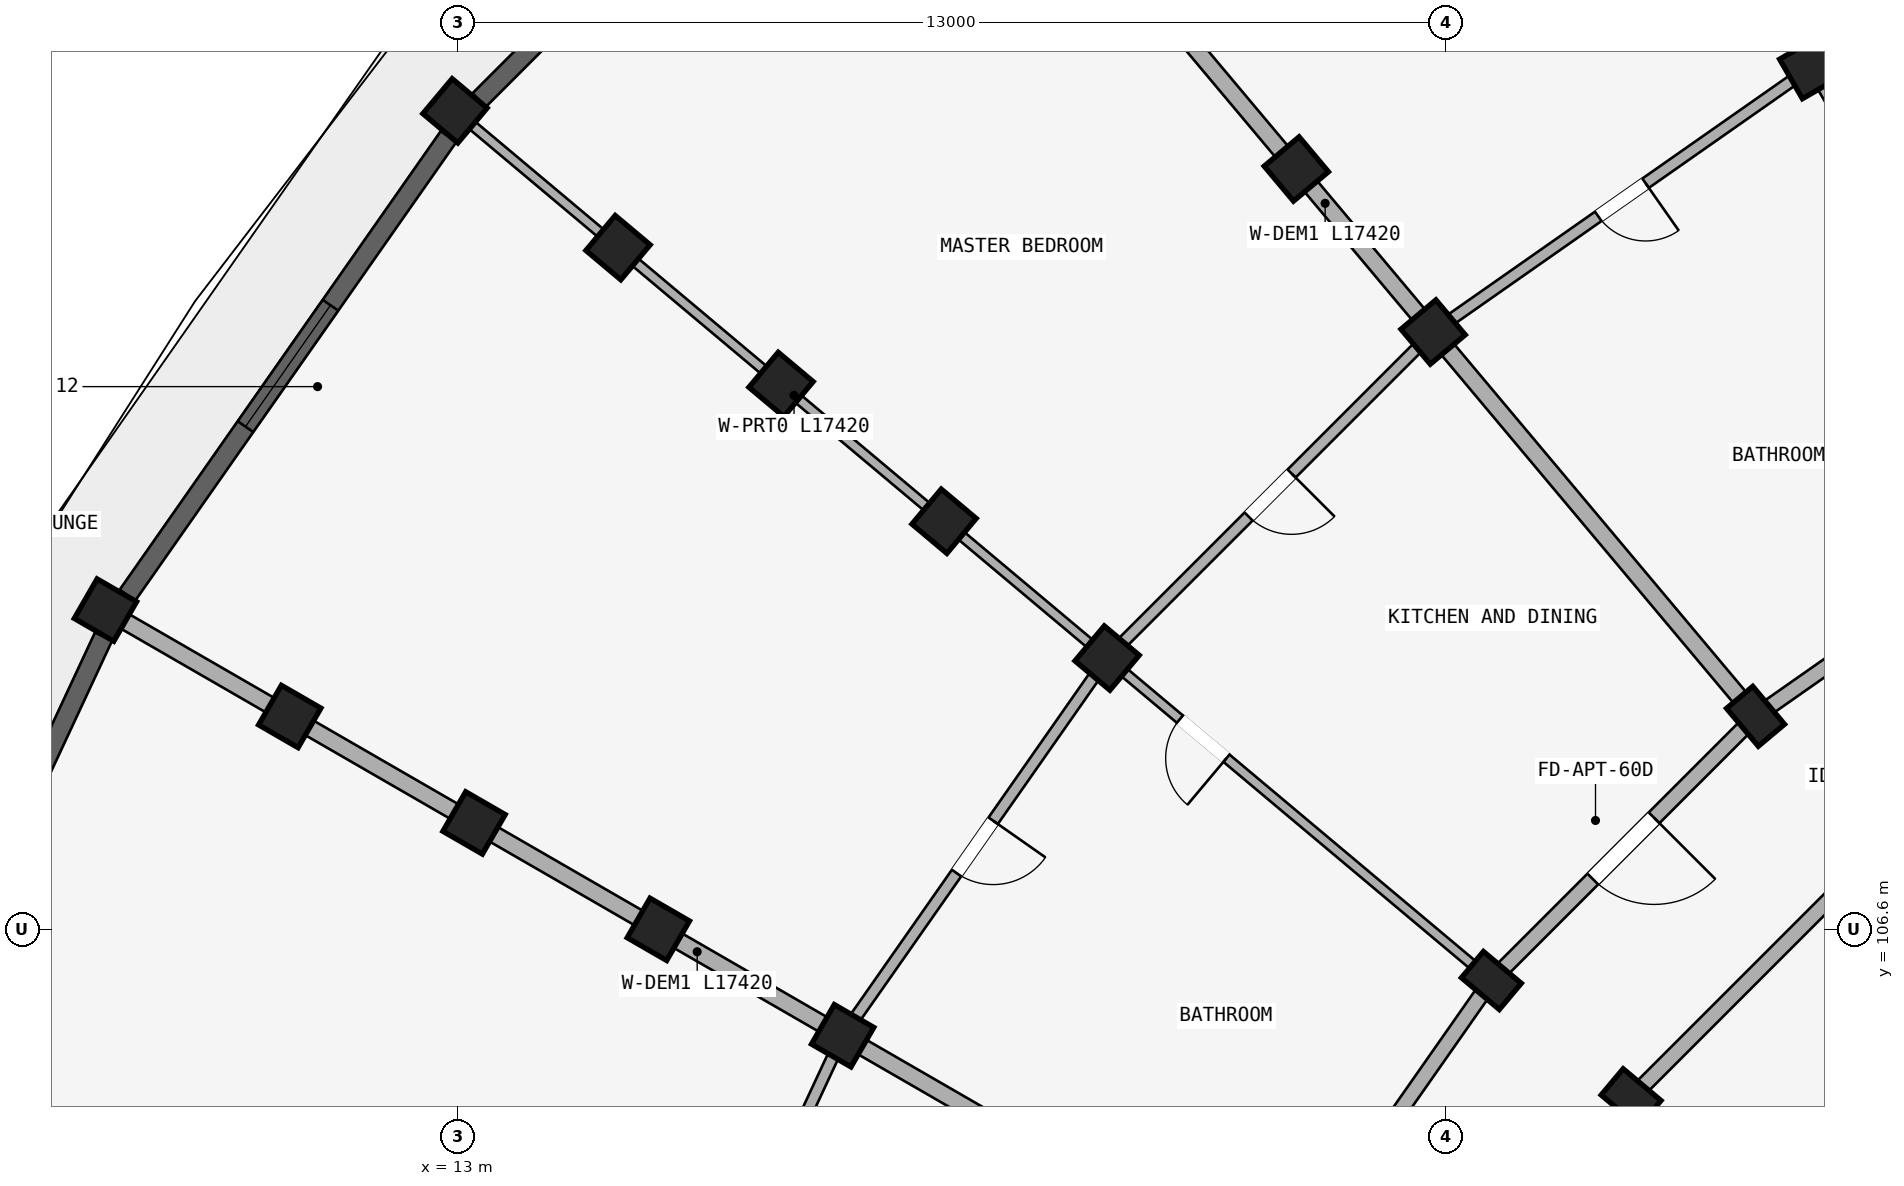
"""IFC4 building model, lengths in metres.
Left out: names, types, materials, properties, quantities, classifications, styles, units other than length and angle.
Written with IfcOpenShell. Run it as: python <this file> out.ifc"""

import sys

from ifc_helpers import new_model, si_unit, direction, frame, frame_2d, origin, origin_2d, place, context, subcontext, project, spatial, rectangle, extrude, element, fill, save


model = new_model("IFC4")
c1 = context("Model", 3, precision=1e-05, world=origin(), true_north=direction((0.0, 1.0)))
c2 = subcontext(c1, "Body", "Model", "MODEL_VIEW")
j1 = project(units=[si_unit("LENGTHUNIT", "METRE"), si_unit("PLANEANGLEUNIT", "RADIAN")], contexts=[c1])
p1 = place(None, origin())
s1 = spatial("IfcSite", under=j1, at=p1, CompositionType="ELEMENT")
p2 = place(p1, origin())
s2 = spatial("IfcBuilding", under=s1, at=p2, CompositionType="ELEMENT")
p3 = place(p2, frame((0.0, 0.0, 37.05)))
s3 = spatial("IfcBuildingStorey", under=s2, at=p3, CompositionType="ELEMENT", Elevation=37.05)
p4 = place(p3, frame((30.8, 117.938, 0.0), z_axis=(0.0, 0.0, 1.0), x_axis=(0.866025403784, 0.5, 0.0)))
e1 = element("IfcColumn", 1, at=p4, inside=s3, PredefinedType="COLUMN", context=c2, shape_type="SweptSolid", body=[
    extrude(rectangle(XDim=0.6, YDim=0.6, at=origin_2d()), origin(), (0.0, 0.0, 1.0), 2.93),
])
p5 = place(p3, frame((30.073, 109.402, 0.0), z_axis=(0.0, 0.0, 1.0), x_axis=(0.766044443119, 0.642787609687, 0.0)))
e2 = element("IfcColumn", 2, at=p5, inside=s3, PredefinedType="COLUMN", context=c2, shape_type="SweptSolid", body=[
    extrude(rectangle(XDim=0.45, YDim=0.65, at=origin_2d()), origin(), (0.0, 0.0, 1.0), 2.93),
])
for number, where, z_axis, x_axis in (
    (3, (25.831, 114.458, 0.0), (0.0, 0.0, 1.0), (0.766, 0.643, 0.0)),
    (4, (24.031, 116.603, 0.0), (0.0, 0.0, 1.0), (0.766, 0.643, 0.0)),
):
    element("IfcColumn", number, at=place(p3, frame(where, z_axis=z_axis, x_axis=x_axis)), inside=s3, PredefinedType="COLUMN", context=c2, shape_type="SweptSolid", body=[
        extrude(rectangle(XDim=0.6, YDim=0.6, at=origin_2d()), origin(), (0.0, 0.0, 1.0), 2.93),
    ])
for number, where, z_axis, x_axis in (
    (5, (28.436, 104.384, 0.0), (0.0, 0.0, 1.0), (0.643, 0.766, 0.0)),
    (6, (26.598, 105.927, 0.0), (0.0, 0.0, 1.0), (0.643, 0.766, 0.0)),
):
    element("IfcColumn", number, at=place(p3, frame(where, z_axis=z_axis, x_axis=x_axis)), inside=s3, PredefinedType="COLUMN", context=c2, shape_type="SweptSolid", body=[
        extrude(rectangle(XDim=0.45, YDim=0.65, at=origin_2d()), origin(), (0.0, 0.0, 1.0), 2.93),
    ])
for number, where, z_axis, x_axis in (
    (7, (21.542, 110.169, 0.0), (0.0, 0.0, 1.0), (0.643, 0.766, 0.0)),
    (8, (19.397, 111.969, 0.0), (0.0, 0.0, 1.0), (0.643, 0.766, 0.0)),
    (9, (17.252, 113.769, 0.0), (0.0, 0.0, 1.0), (0.643, 0.766, 0.0)),
    (10, (15.107, 115.568, 0.0), (0.0, 0.0, 1.0), (0.643, 0.766, 0.0)),
):
    element("IfcColumn", number, at=place(p3, frame(where, z_axis=z_axis, x_axis=x_axis)), inside=s3, PredefinedType="COLUMN", context=c2, shape_type="SweptSolid", body=[
        extrude(rectangle(XDim=0.6, YDim=0.6, at=origin_2d()), origin(), (0.0, 0.0, 1.0), 2.93),
    ])
p6 = place(p3, frame((12.962, 117.368, 0.0), z_axis=(0.0, 0.0, 1.0), x_axis=(0.642787609687, 0.766044443119, 0.0)))
e11 = element("IfcColumn", 11, at=p6, inside=s3, PredefinedType="COLUMN", context=c2, shape_type="SweptSolid", body=[
    extrude(rectangle(XDim=0.6, YDim=0.6, at=origin_2d()), origin(), (0.0, 0.0, 1.0), 2.97),
])
for number, where, z_axis, x_axis in (
    (12, (18.062, 105.2, 0.0), (0.0, 0.0, 1.0), (0.5, 0.866, 0.0)),
    (13, (15.637, 106.6, 0.0), (0.0, 0.0, 1.0), (0.5, 0.866, 0.0)),
    (14, (13.213, 108.0, 0.0), (0.0, 0.0, 1.0), (0.5, 0.866, 0.0)),
    (15, (10.788, 109.4, 0.0), (0.0, 0.0, 1.0), (0.5, 0.866, 0.0)),
):
    element("IfcColumn", number, at=place(p3, frame(where, z_axis=z_axis, x_axis=x_axis)), inside=s3, PredefinedType="COLUMN", context=c2, shape_type="SweptSolid", body=[
        extrude(rectangle(XDim=0.6, YDim=0.6, at=origin_2d()), origin(), (0.0, 0.0, 1.0), 2.93),
    ])
p7 = place(p3, frame((8.363, 110.8, 0.0), z_axis=(0.0, 0.0, 1.0), x_axis=(0.5, 0.866025403784, 0.0)))
e16 = element("IfcColumn", 16, at=p7, inside=s3, PredefinedType="COLUMN", context=c2, shape_type="SweptSolid", body=[
    extrude(rectangle(XDim=0.6, YDim=0.6, at=origin_2d()), origin(), (0.0, 0.0, 1.0), 2.97),
])
p8 = place(p3, frame((34.1, 112.222, 0.0), z_axis=(0.0, 0.0, 1.0), x_axis=(-0.819140911474, -0.573592335331, 0.0)))
e17 = element("IfcWall", 17, at=p8, inside=s3, PredefinedType="STANDARD", context=c2, shape_type="SweptSolid", body=[
    extrude(rectangle(XDim=4.916, YDim=0.2, at=frame_2d((2.458, 0.0))), origin(), (0.0, 0.0, 1.0), 2.372),
])
p9 = place(p3, frame((31.616, 107.564, 0.0), z_axis=(0.0, 0.0, 1.0), x_axis=(-0.707106781187, -0.707106781187, 0.0)))
e18 = element("IfcWall", 18, at=p9, inside=s3, PredefinedType="STANDARD", context=c2, shape_type="SweptSolid", body=[
    extrude(rectangle(XDim=4.497, YDim=0.2, at=frame_2d((2.249, 0.0))), origin(), (0.0, 0.0, 1.0), 2.372),
])
p10 = place(p3, frame((30.073, 109.402, 0.0), z_axis=(0.0, 0.0, 1.0), x_axis=(-0.707106781187, -0.707106781187, 0.0)))
e19 = element("IfcWall", 19, at=p10, inside=s3, PredefinedType="STANDARD", context=c2, shape_type="SweptSolid", body=[
    extrude(rectangle(XDim=4.916, YDim=0.2, at=frame_2d((2.458, 0.0))), origin(), (0.0, 0.0, 1.0), 2.372),
])
p11 = place(p10, frame((1.888, 0.0, 0.0)))
e20 = element("IfcOpeningElement", 20, at=p11, cuts=e19, PredefinedType="OPENING", context=c2, shape_type="SweptSolid", body=[
    extrude(rectangle(XDim=1.14, YDim=2.15, at=frame_2d((0.57, 1.075))), frame((0.0, 0.11, 0.0), z_axis=(0.0, -1.0, 0.0), x_axis=(1.0, 0.0, 0.0)), (0.0, 0.0, 1.0), 0.22),
])
p12 = place(p3, frame((28.436, 104.384, 0.0), z_axis=(0.0, 0.0, 1.0), x_axis=(-0.573571637217, -0.819155404658, 0.0)))
e21 = element("IfcWall", 21, at=p12, inside=s3, PredefinedType="STANDARD", context=c2, shape_type="SweptSolid", body=[
    extrude(rectangle(XDim=4.497, YDim=0.2, at=frame_2d((2.249, 0.0))), origin(), (0.0, 0.0, 1.0), 2.372),
])
p13 = place(p3, frame((26.598, 105.927, 0.0), z_axis=(0.0, 0.0, 1.0), x_axis=(-0.573592335331, -0.819140911474, 0.0)))
e22 = element("IfcWall", 22, at=p13, inside=s3, PredefinedType="STANDARD", context=c2, shape_type="SweptSolid", body=[
    extrude(rectangle(XDim=4.916, YDim=0.2, at=frame_2d((2.458, 0.0))), origin(), (0.0, 0.0, 1.0), 2.372),
])
p14 = place(p3, frame((34.05, 112.309, 0.0), z_axis=(0.0, 0.0, 1.0), x_axis=(-0.499997843263, 0.866026648973, 0.0)))
e23 = element("IfcWall", 23, at=p14, inside=s3, PredefinedType="PARTITIONING", context=c2, shape_type="SweptSolid", body=[
    extrude(rectangle(XDim=17.42, YDim=0.125, at=frame_2d((8.71, 0.0))), origin(), (0.0, 0.0, 1.0), 2.372),
])
p15 = place(p14, frame((4.45, 0.0, 0.0)))
e24 = element("IfcOpeningElement", 24, at=p15, cuts=e23, PredefinedType="OPENING", context=c2, shape_type="SweptSolid", body=[
    extrude(rectangle(XDim=0.8, YDim=2.1, at=frame_2d((0.4, 1.05))), frame((0.0, 0.073, 0.0), z_axis=(0.0, -1.0, 0.0), x_axis=(1.0, 0.0, 0.0)), (0.0, 0.0, 1.0), 0.145),
])
p16 = place(p3, frame((30.009, 109.479, 0.0), z_axis=(0.0, 0.0, 1.0), x_axis=(-0.642784757967, 0.766046835987, 0.0)))
e25 = element("IfcWall", 25, at=p16, inside=s3, PredefinedType="STANDARD", context=c2, shape_type="SweptSolid", body=[
    extrude(rectangle(XDim=17.42, YDim=0.22, at=frame_2d((8.71, 0.0))), origin(), (0.0, 0.0, 1.0), 2.372),
])
p17 = place(p3, frame((33.645, 100.013, 0.0), z_axis=(0.0, 0.0, 1.0), x_axis=(-0.766046761698, 0.642784846501, 0.0)))
e26 = element("IfcWall", 26, at=p17, inside=s3, PredefinedType="PARTITIONING", context=c2, shape_type="SweptSolid", body=[
    extrude(rectangle(XDim=6.75, YDim=0.15, at=frame_2d((3.375, 0.0))), origin(), (0.0, 0.0, 1.0), 2.372),
])
p18 = place(p17, frame((3.222, 0.0, 0.0)))
e27 = element("IfcOpeningElement", 27, at=p18, cuts=e26, PredefinedType="OPENING", context=c2, shape_type="SweptSolid", body=[
    extrude(rectangle(XDim=0.98, YDim=2.12, at=frame_2d((0.49, 1.06))), frame((0.0, 0.085, 0.0), z_axis=(0.0, -1.0, 0.0), x_axis=(1.0, 0.0, 0.0)), (0.0, 0.0, 1.0), 0.17),
])
p19 = place(p3, frame((26.521, 105.991, 0.0), z_axis=(0.0, 0.0, 1.0), x_axis=(-0.766046835987, 0.642784757967, 0.0)))
e28 = element("IfcWall", 28, at=p19, inside=s3, PredefinedType="PARTITIONING", context=c2, shape_type="SweptSolid", body=[
    extrude(rectangle(XDim=17.42, YDim=0.125, at=frame_2d((8.71, 0.0))), origin(), (0.0, 0.0, 1.0), 2.372),
])
p20 = place(p19, frame((4.45, 0.0, 0.0)))
e29 = element("IfcOpeningElement", 29, at=p20, cuts=e28, PredefinedType="OPENING", context=c2, shape_type="SweptSolid", body=[
    extrude(rectangle(XDim=0.8, YDim=2.1, at=frame_2d((0.4, 1.05))), frame((0.0, 0.073, 0.0), z_axis=(0.0, -1.0, 0.0), x_axis=(1.0, 0.0, 0.0)), (0.0, 0.0, 1.0), 0.145),
])
p21 = place(p3, frame((23.691, 101.95, 0.0), z_axis=(0.0, 0.0, 1.0), x_axis=(-0.866026648973, 0.499997843263, 0.0)))
e30 = element("IfcWall", 30, at=p21, inside=s3, PredefinedType="STANDARD", context=c2, shape_type="SweptSolid", body=[
    extrude(rectangle(XDim=17.42, YDim=0.22, at=frame_2d((8.71, 0.0))), origin(), (0.0, 0.0, 1.0), 2.372),
])
p22 = place(p3, frame((36.298, 120.501, 0.0), z_axis=(0.0, 0.0, 1.0), x_axis=(-0.906312656069, -0.42260781991, 0.0)))
e31 = element("IfcWall", 31, at=p22, inside=s3, PredefinedType="PLUMBINGWALL", context=c2, shape_type="SweptSolid", body=[
    extrude(rectangle(XDim=6.066, YDim=0.15, at=frame_2d((3.033, 0.0))), origin(), (0.0, 0.0, 1.0), 2.372),
])
p23 = place(p22, frame((2.613, 0.0, 0.0)))
e32 = element("IfcOpeningElement", 32, at=p23, cuts=e31, PredefinedType="OPENING", context=c2, shape_type="SweptSolid", body=[
    extrude(rectangle(XDim=0.84, YDim=2.1, at=frame_2d((0.42, 1.05))), frame((0.0, 0.085, 0.0), z_axis=(0.0, -1.0, 0.0), x_axis=(1.0, 0.0, 0.0)), (0.0, 0.0, 1.0), 0.17),
])
p24 = place(p3, frame((30.8, 117.938, 0.0), z_axis=(0.0, 0.0, 1.0), x_axis=(-0.81913926159, -0.573594691504, 0.0)))
e33 = element("IfcWall", 33, at=p24, inside=s3, PredefinedType="PLUMBINGWALL", context=c2, shape_type="SweptSolid", body=[
    extrude(rectangle(XDim=6.066, YDim=0.15, at=frame_2d((3.033, 0.0))), origin(), (0.0, 0.0, 1.0), 2.372),
])
p25 = place(p24, frame((2.653, 0.0, 0.0)))
e34 = element("IfcOpeningElement", 34, at=p25, cuts=e33, PredefinedType="OPENING", context=c2, shape_type="SweptSolid", body=[
    extrude(rectangle(XDim=0.76, YDim=2.05, at=frame_2d((0.38, 1.025))), frame((0.0, 0.085, 0.0), z_axis=(0.0, -1.0, 0.0), x_axis=(1.0, 0.0, 0.0)), (0.0, 0.0, 1.0), 0.17),
])
p26 = place(p3, frame((25.831, 114.458, 0.0), z_axis=(0.0, 0.0, 1.0), x_axis=(-0.707106781187, -0.707106781187, 0.0)))
e35 = element("IfcWall", 35, at=p26, inside=s3, PredefinedType="PLUMBINGWALL", context=c2, shape_type="SweptSolid", body=[
    extrude(rectangle(XDim=6.066, YDim=0.15, at=frame_2d((3.033, 0.0))), origin(), (0.0, 0.0, 1.0), 2.372),
])
p27 = place(p26, frame((2.633, 0.0, 0.0)))
e36 = element("IfcOpeningElement", 36, at=p27, cuts=e35, PredefinedType="OPENING", context=c2, shape_type="SweptSolid", body=[
    extrude(rectangle(XDim=0.8, YDim=2.1, at=frame_2d((0.4, 1.05))), frame((0.0, 0.085, 0.0), z_axis=(0.0, -1.0, 0.0), x_axis=(1.0, 0.0, 0.0)), (0.0, 0.0, 1.0), 0.17),
])
p28 = place(p3, frame((21.542, 110.169, 0.0), z_axis=(0.0, 0.0, 1.0), x_axis=(-0.573594691504, -0.81913926159, 0.0)))
e37 = element("IfcWall", 37, at=p28, inside=s3, PredefinedType="PLUMBINGWALL", context=c2, shape_type="SweptSolid", body=[
    extrude(rectangle(XDim=6.066, YDim=0.15, at=frame_2d((3.033, 0.0))), origin(), (0.0, 0.0, 1.0), 2.372),
])
p29 = place(p28, frame((2.613, 0.0, 0.0)))
e38 = element("IfcOpeningElement", 38, at=p29, cuts=e37, PredefinedType="OPENING", context=c2, shape_type="SweptSolid", body=[
    extrude(rectangle(XDim=0.84, YDim=2.1, at=frame_2d((0.42, 1.05))), frame((0.0, 0.085, 0.0), z_axis=(0.0, -1.0, 0.0), x_axis=(1.0, 0.0, 0.0)), (0.0, 0.0, 1.0), 0.17),
])
p30 = place(p3, frame((18.062, 105.2, 0.0), z_axis=(0.0, 0.0, 1.0), x_axis=(-0.42260781991, -0.906312656069, 0.0)))
e39 = element("IfcWall", 39, at=p30, inside=s3, PredefinedType="PLUMBINGWALL", context=c2, shape_type="SweptSolid", body=[
    extrude(rectangle(XDim=6.066, YDim=0.15, at=frame_2d((3.033, 0.0))), origin(), (0.0, 0.0, 1.0), 2.372),
])
p31 = place(p30, frame((2.653, 0.0, 0.0)))
e40 = element("IfcOpeningElement", 40, at=p31, cuts=e39, PredefinedType="OPENING", context=c2, shape_type="SweptSolid", body=[
    extrude(rectangle(XDim=0.76, YDim=2.05, at=frame_2d((0.38, 1.025))), frame((0.0, 0.085, 0.0), z_axis=(0.0, -1.0, 0.0), x_axis=(1.0, 0.0, 0.0)), (0.0, 0.0, 1.0), 0.17),
])
p32 = place(p3, frame((18.49, 122.719, 0.0), z_axis=(0.0, 0.0, 1.0), x_axis=(-0.707106781187, -0.707106781187, 0.0)))
e41 = element("IfcWall", 41, at=p32, inside=s3, PredefinedType="STANDARD", context=c2, shape_type="SweptSolid", body=[
    extrude(rectangle(XDim=7.367, YDim=0.25, at=frame_2d((3.684, 0.0))), origin(), (0.0, 0.0, 1.0), 2.412),
])
p33 = place(p32, frame((4.84, 0.0, 0.412)))
e42 = element("IfcOpeningElement", 42, at=p33, cuts=e41, PredefinedType="OPENING", context=c2, shape_type="SweptSolid", body=[
    extrude(rectangle(XDim=1.2, YDim=1.5, at=frame_2d((0.6, 0.75))), frame((0.0, 0.135, 0.0), z_axis=(0.0, -1.0, 0.0), x_axis=(1.0, 0.0, 0.0)), (0.0, 0.0, 1.0), 0.27),
])
p34 = place(p32, frame((1.979, 0.0, 0.0)))
e43 = element("IfcOpeningElement", 43, at=p34, cuts=e41, PredefinedType="OPENING", context=c2, shape_type="SweptSolid", body=[
    extrude(rectangle(XDim=1.2, YDim=2.15, at=frame_2d((0.6, 1.075))), frame((0.0, 0.135, 0.0), z_axis=(0.0, -1.0, 0.0), x_axis=(1.0, 0.0, 0.0)), (0.0, 0.0, 1.0), 0.27),
])
p35 = place(p3, frame((12.878, 117.03, 0.0), z_axis=(0.0, 0.0, 1.0), x_axis=(-0.573582441919, -0.819147839112, 0.0)))
e44 = element("IfcWall", 44, at=p35, inside=s3, PredefinedType="STANDARD", context=c2, shape_type="SweptSolid", body=[
    extrude(rectangle(XDim=7.367, YDim=0.25, at=frame_2d((3.684, 0.0))), origin(), (0.0, 0.0, 1.0), 2.412),
])
p36 = place(p35, frame((2.708, 0.0, 0.362)))
e45 = element("IfcOpeningElement", 45, at=p36, cuts=e44, PredefinedType="OPENING", context=c2, shape_type="SweptSolid", body=[
    extrude(rectangle(XDim=1.95, YDim=1.85, at=frame_2d((0.975, 0.925))), frame((0.0, 0.135, 0.0), z_axis=(0.0, -1.0, 0.0), x_axis=(1.0, 0.0, 0.0)), (0.0, 0.0, 1.0), 0.27),
])
p37 = place(p3, frame((8.338, 110.452, 0.0), z_axis=(0.0, 0.0, 1.0), x_axis=(-0.422589730823, -0.906321090675, 0.0)))
e46 = element("IfcWall", 46, at=p37, inside=s3, PredefinedType="STANDARD", context=c2, shape_type="SweptSolid", body=[
    extrude(rectangle(XDim=7.367, YDim=0.25, at=frame_2d((3.684, 0.0))), origin(), (0.0, 0.0, 1.0), 2.412),
])
p38 = place(p37, frame((2.783, 0.0, 0.562)))
e47 = element("IfcOpeningElement", 47, at=p38, cuts=e46, PredefinedType="OPENING", context=c2, shape_type="SweptSolid", body=[
    extrude(rectangle(XDim=1.8, YDim=1.65, at=frame_2d((0.9, 0.825))), frame((0.0, 0.135, 0.0), z_axis=(0.0, -1.0, 0.0), x_axis=(1.0, 0.0, 0.0)), (0.0, 0.0, 1.0), 0.27),
])
p39 = place(p36, origin())
e48 = element("IfcWindow", 48, at=p39, inside=s3, PartitioningType="DOUBLE_PANEL_VERTICAL", PredefinedType="WINDOW", context=c2, shape_type="SweptSolid", body=[
    extrude(rectangle(XDim=1.95, YDim=1.85, at=frame_2d((0.975, 0.925))), frame((0.0, 0.03, 0.0), z_axis=(0.0, -1.0, 0.0), x_axis=(1.0, 0.0, 0.0)), (0.0, 0.0, 1.0), 0.06),
])
fill(e45, e48)
p40 = place(p20, frame((0.8, 0.0, 0.0), z_axis=(0.0, 0.0, 1.0), x_axis=(-1.0, 0.0, 0.0)))
e49 = element("IfcDoor", 49, at=p40, inside=s3, OperationType="SINGLE_SWING_RIGHT", PredefinedType="DOOR", context=c2, shape_type="SweptSolid", body=[
    extrude(rectangle(XDim=0.8, YDim=2.1, at=frame_2d((0.4, 1.05))), frame((0.0, 0.025, 0.0), z_axis=(0.0, -1.0, 0.0), x_axis=(1.0, 0.0, 0.0)), (0.0, 0.0, 1.0), 0.05),
])
fill(e29, e49)
p41 = place(p25, frame((0.76, 0.0, 0.0), z_axis=(0.0, 0.0, 1.0), x_axis=(-1.0, 0.0, 0.0)))
e50 = element("IfcDoor", 50, at=p41, inside=s3, OperationType="SINGLE_SWING_RIGHT", PredefinedType="DOOR", context=c2, shape_type="SweptSolid", body=[
    extrude(rectangle(XDim=0.76, YDim=2.05, at=frame_2d((0.38, 1.025))), frame((0.0, 0.025, 0.0), z_axis=(0.0, -1.0, 0.0), x_axis=(1.0, 0.0, 0.0)), (0.0, 0.0, 1.0), 0.05),
])
fill(e34, e50)
p42 = place(p11, origin())
e51 = element("IfcDoor", 51, at=p42, inside=s3, OperationType="SINGLE_SWING_LEFT", PredefinedType="DOOR", context=c2, shape_type="SweptSolid", body=[
    extrude(rectangle(XDim=1.14, YDim=2.15, at=frame_2d((0.57, 1.075))), frame((0.0, 0.025, 0.0), z_axis=(0.0, -1.0, 0.0), x_axis=(1.0, 0.0, 0.0)), (0.0, 0.0, 1.0), 0.05),
])
fill(e20, e51)
p43 = place(p27, frame((0.8, 0.0, 0.0), z_axis=(0.0, 0.0, 1.0), x_axis=(-1.0, 0.0, 0.0)))
e52 = element("IfcDoor", 52, at=p43, inside=s3, OperationType="SINGLE_SWING_RIGHT", PredefinedType="DOOR", context=c2, shape_type="SweptSolid", body=[
    extrude(rectangle(XDim=0.8, YDim=2.1, at=frame_2d((0.4, 1.05))), frame((0.0, 0.025, 0.0), z_axis=(0.0, -1.0, 0.0), x_axis=(1.0, 0.0, 0.0)), (0.0, 0.0, 1.0), 0.05),
])
fill(e36, e52)
p44 = place(p29, origin())
e53 = element("IfcDoor", 53, at=p44, inside=s3, OperationType="SINGLE_SWING_LEFT", PredefinedType="DOOR", context=c2, shape_type="SweptSolid", body=[
    extrude(rectangle(XDim=0.84, YDim=2.1, at=frame_2d((0.42, 1.05))), frame((0.0, 0.025, 0.0), z_axis=(0.0, -1.0, 0.0), x_axis=(1.0, 0.0, 0.0)), (0.0, 0.0, 1.0), 0.05),
])
fill(e38, e53)
save(model, sys.argv[1])
